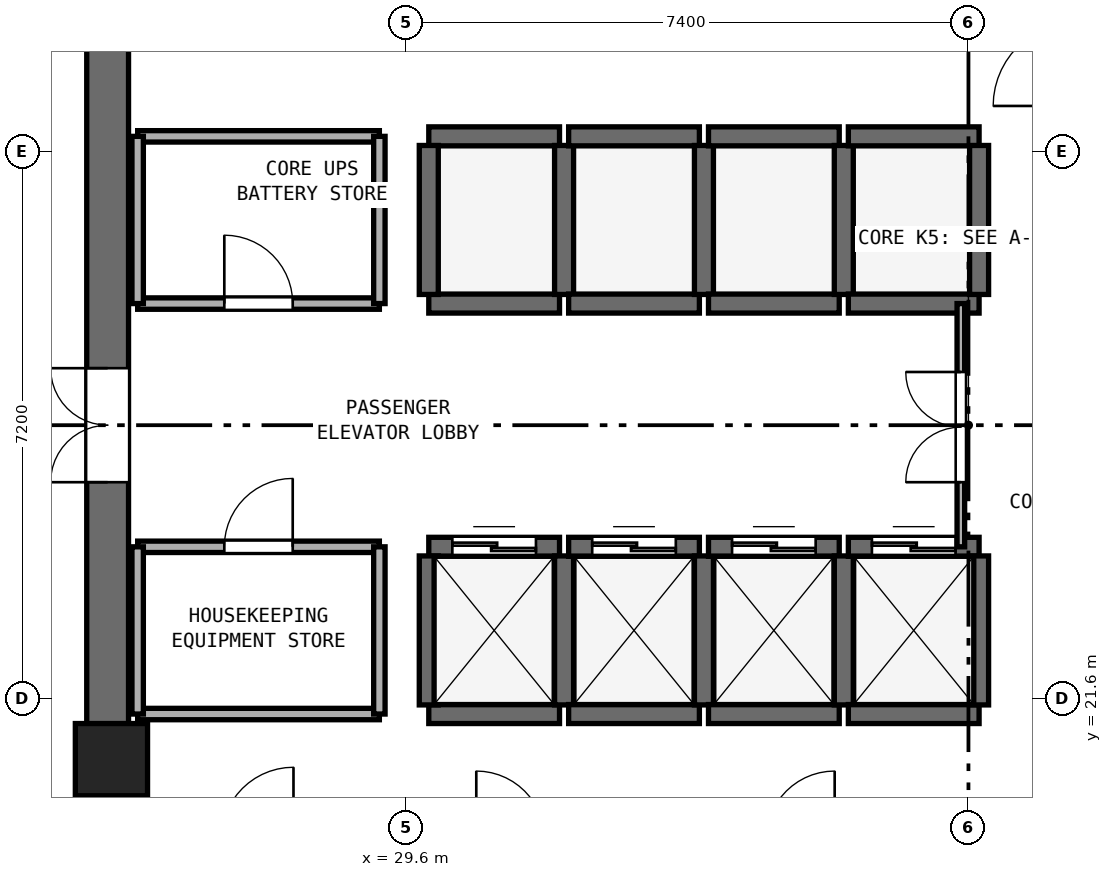
"""IFC4 building model, lengths in metres.
Left out: names, types, materials, properties, quantities, classifications, styles, units other than length and angle.
Written with IfcOpenShell. Run it as: python <this file> out.ifc"""

import sys

from ifc_helpers import new_model, si_unit, direction, frame, frame_2d, origin, origin_2d, place, context, subcontext, project, spatial, rectangle, extrude, element, fill, save


model = new_model("IFC4")
c1 = context("Model", 3, precision=1e-05, world=origin(), true_north=direction((0.0, 1.0)))
c2 = subcontext(c1, "Body", "Model", "MODEL_VIEW")
j1 = project(units=[si_unit("LENGTHUNIT", "METRE"), si_unit("PLANEANGLEUNIT", "RADIAN")], contexts=[c1])
p1 = place(None, origin())
s1 = spatial("IfcSite", under=j1, at=p1, CompositionType="ELEMENT")
p2 = place(p1, origin())
s2 = spatial("IfcBuilding", under=s1, at=p2, CompositionType="ELEMENT")
p3 = place(p2, frame((0.0, 0.0, 166.8)))
s3 = spatial("IfcBuildingStorey", under=s2, at=p3, CompositionType="ELEMENT", Elevation=166.8)
p4 = place(p3, frame((25.675, 17.55, 0.0), z_axis=(0.0, 0.0, 1.0), x_axis=(0.0, 1.0, 0.0)))
e1 = element("IfcWall", 1, at=p4, inside=s3, PredefinedType="SHEAR", context=c2, shape_type="SweptSolid", body=[
    extrude(rectangle(XDim=15.3, YDim=0.55, at=frame_2d((7.65, 0.0))), origin(), (0.0, 0.0, 1.0), 3.54),
])
p5 = place(p4, frame((6.9, 0.0, 0.0)))
e2 = element("IfcOpeningElement", 2, at=p5, cuts=e1, PredefinedType="OPENING", context=c2, shape_type="SweptSolid", body=[
    extrude(rectangle(XDim=1.5, YDim=2.15, at=frame_2d((0.75, 1.075))), frame((0.0, 0.285, 0.0), z_axis=(0.0, -1.0, 0.0), x_axis=(1.0, 0.0, 0.0)), (0.0, 0.0, 1.0), 0.57),
])
p6 = place(p3, frame((25.725, 20.8, 0.0), z_axis=(0.0, 0.0, 1.0), x_axis=(1.0, 0.0, 0.0)))
e3 = element("IfcColumn", 3, at=p6, inside=s3, PredefinedType="PILASTER", context=c2, shape_type="SweptSolid", body=[
    extrude(rectangle(XDim=0.95, YDim=0.95, at=origin_2d()), origin(), (0.0, 0.0, 1.0), 3.8),
])
p7 = place(p3, frame((29.9, 21.4, 0.0), z_axis=(0.0, 0.0, 1.0), x_axis=(1.0, 0.0, 0.0)))
e4 = element("IfcWall", 4, at=p7, inside=s3, PredefinedType="SHEAR", context=c2, shape_type="SweptSolid", body=[
    extrude(rectangle(XDim=1.72, YDim=0.25, at=frame_2d((0.86, 0.0))), origin(), (0.0, 0.0, 1.0), 3.54),
])
p8 = place(p3, frame((29.9, 23.6, 0.0), z_axis=(0.0, 0.0, 1.0), x_axis=(1.0, 0.0, 0.0)))
e5 = element("IfcWall", 5, at=p8, inside=s3, PredefinedType="SHEAR", context=c2, shape_type="SweptSolid", body=[
    extrude(rectangle(XDim=1.72, YDim=0.25, at=frame_2d((0.86, 0.0))), origin(), (0.0, 0.0, 1.0), 3.54),
])
p9 = place(p8, frame((0.31, 0.0, 0.0)))
e6 = element("IfcOpeningElement", 6, at=p9, cuts=e5, PredefinedType="OPENING", context=c2, shape_type="SweptSolid", body=[
    extrude(rectangle(XDim=1.1, YDim=2.15, at=frame_2d((0.55, 1.075))), frame((0.0, 0.135, 0.0), z_axis=(0.0, -1.0, 0.0), x_axis=(1.0, 0.0, 0.0)), (0.0, 0.0, 1.0), 0.27),
])
for number, where, z_axis, x_axis in (
    (7, (29.9, 21.52, 0.0), (0.0, 0.0, 1.0), (0.0, 1.0, 0.0)),
    (8, (31.68, 21.52, 0.0), (0.0, 0.0, 1.0), (0.0, 1.0, 0.0)),
):
    element("IfcWall", number, at=place(p3, frame(where, z_axis=z_axis, x_axis=x_axis)), inside=s3, PredefinedType="SHEAR", context=c2, shape_type="SweptSolid", body=[
        extrude(rectangle(XDim=1.96, YDim=0.25, at=frame_2d((0.98, 0.0))), origin(), (0.0, 0.0, 1.0), 3.54),
    ])
p10 = place(p3, frame((31.74, 21.4, 0.0), z_axis=(0.0, 0.0, 1.0), x_axis=(1.0, 0.0, 0.0)))
e9 = element("IfcWall", 9, at=p10, inside=s3, PredefinedType="SHEAR", context=c2, shape_type="SweptSolid", body=[
    extrude(rectangle(XDim=1.72, YDim=0.25, at=frame_2d((0.86, 0.0))), origin(), (0.0, 0.0, 1.0), 3.54),
])
p11 = place(p3, frame((31.74, 23.6, 0.0), z_axis=(0.0, 0.0, 1.0), x_axis=(1.0, 0.0, 0.0)))
e10 = element("IfcWall", 10, at=p11, inside=s3, PredefinedType="SHEAR", context=c2, shape_type="SweptSolid", body=[
    extrude(rectangle(XDim=1.72, YDim=0.25, at=frame_2d((0.86, 0.0))), origin(), (0.0, 0.0, 1.0), 3.54),
])
p12 = place(p11, frame((0.31, 0.0, 0.0)))
e11 = element("IfcOpeningElement", 11, at=p12, cuts=e10, PredefinedType="OPENING", context=c2, shape_type="SweptSolid", body=[
    extrude(rectangle(XDim=1.1, YDim=2.15, at=frame_2d((0.55, 1.075))), frame((0.0, 0.135, 0.0), z_axis=(0.0, -1.0, 0.0), x_axis=(1.0, 0.0, 0.0)), (0.0, 0.0, 1.0), 0.27),
])
p13 = place(p3, frame((33.52, 21.52, 0.0), z_axis=(0.0, 0.0, 1.0), x_axis=(0.0, 1.0, 0.0)))
e12 = element("IfcWall", 12, at=p13, inside=s3, PredefinedType="SHEAR", context=c2, shape_type="SweptSolid", body=[
    extrude(rectangle(XDim=1.96, YDim=0.25, at=frame_2d((0.98, 0.0))), origin(), (0.0, 0.0, 1.0), 3.54),
])
p14 = place(p3, frame((33.58, 21.4, 0.0), z_axis=(0.0, 0.0, 1.0), x_axis=(1.0, 0.0, 0.0)))
e13 = element("IfcWall", 13, at=p14, inside=s3, PredefinedType="SHEAR", context=c2, shape_type="SweptSolid", body=[
    extrude(rectangle(XDim=1.72, YDim=0.25, at=frame_2d((0.86, 0.0))), origin(), (0.0, 0.0, 1.0), 3.54),
])
p15 = place(p3, frame((33.58, 23.6, 0.0), z_axis=(0.0, 0.0, 1.0), x_axis=(1.0, 0.0, 0.0)))
e14 = element("IfcWall", 14, at=p15, inside=s3, PredefinedType="SHEAR", context=c2, shape_type="SweptSolid", body=[
    extrude(rectangle(XDim=1.72, YDim=0.25, at=frame_2d((0.86, 0.0))), origin(), (0.0, 0.0, 1.0), 3.54),
])
p16 = place(p15, frame((0.31, 0.0, 0.0)))
e15 = element("IfcOpeningElement", 15, at=p16, cuts=e14, PredefinedType="OPENING", context=c2, shape_type="SweptSolid", body=[
    extrude(rectangle(XDim=1.1, YDim=2.15, at=frame_2d((0.55, 1.075))), frame((0.0, 0.135, 0.0), z_axis=(0.0, -1.0, 0.0), x_axis=(1.0, 0.0, 0.0)), (0.0, 0.0, 1.0), 0.27),
])
p17 = place(p3, frame((35.36, 21.52, 0.0), z_axis=(0.0, 0.0, 1.0), x_axis=(0.0, 1.0, 0.0)))
e16 = element("IfcWall", 16, at=p17, inside=s3, PredefinedType="SHEAR", context=c2, shape_type="SweptSolid", body=[
    extrude(rectangle(XDim=1.96, YDim=0.25, at=frame_2d((0.98, 0.0))), origin(), (0.0, 0.0, 1.0), 3.54),
])
p18 = place(p3, frame((35.42, 21.4, 0.0), z_axis=(0.0, 0.0, 1.0), x_axis=(1.0, 0.0, 0.0)))
e17 = element("IfcWall", 17, at=p18, inside=s3, PredefinedType="SHEAR", context=c2, shape_type="SweptSolid", body=[
    extrude(rectangle(XDim=1.72, YDim=0.25, at=frame_2d((0.86, 0.0))), origin(), (0.0, 0.0, 1.0), 3.54),
])
p19 = place(p3, frame((35.42, 23.6, 0.0), z_axis=(0.0, 0.0, 1.0), x_axis=(1.0, 0.0, 0.0)))
e18 = element("IfcWall", 18, at=p19, inside=s3, PredefinedType="SHEAR", context=c2, shape_type="SweptSolid", body=[
    extrude(rectangle(XDim=1.72, YDim=0.25, at=frame_2d((0.86, 0.0))), origin(), (0.0, 0.0, 1.0), 3.54),
])
p20 = place(p19, frame((0.31, 0.0, 0.0)))
e19 = element("IfcOpeningElement", 19, at=p20, cuts=e18, PredefinedType="OPENING", context=c2, shape_type="SweptSolid", body=[
    extrude(rectangle(XDim=1.1, YDim=2.15, at=frame_2d((0.55, 1.075))), frame((0.0, 0.135, 0.0), z_axis=(0.0, -1.0, 0.0), x_axis=(1.0, 0.0, 0.0)), (0.0, 0.0, 1.0), 0.27),
])
p21 = place(p3, frame((37.14, 21.52, 0.0), z_axis=(0.0, 0.0, 1.0), x_axis=(0.0, 1.0, 0.0)))
e20 = element("IfcWall", 20, at=p21, inside=s3, PredefinedType="SHEAR", context=c2, shape_type="SweptSolid", body=[
    extrude(rectangle(XDim=1.96, YDim=0.25, at=frame_2d((0.98, 0.0))), origin(), (0.0, 0.0, 1.0), 3.54),
])
for number, where, z_axis, x_axis in (
    (21, (29.9, 26.8, 0.0), (0.0, 0.0, 1.0), (1.0, 0.0, 0.0)),
    (22, (29.9, 29.0, 0.0), (0.0, 0.0, 1.0), (1.0, 0.0, 0.0)),
):
    element("IfcWall", number, at=place(p3, frame(where, z_axis=z_axis, x_axis=x_axis)), inside=s3, PredefinedType="SHEAR", context=c2, shape_type="SweptSolid", body=[
        extrude(rectangle(XDim=1.72, YDim=0.25, at=frame_2d((0.86, 0.0))), origin(), (0.0, 0.0, 1.0), 3.54),
    ])
for number, where, z_axis, x_axis in (
    (23, (29.9, 26.92, 0.0), (0.0, 0.0, 1.0), (0.0, 1.0, 0.0)),
    (24, (31.68, 26.92, 0.0), (0.0, 0.0, 1.0), (0.0, 1.0, 0.0)),
):
    element("IfcWall", number, at=place(p3, frame(where, z_axis=z_axis, x_axis=x_axis)), inside=s3, PredefinedType="SHEAR", context=c2, shape_type="SweptSolid", body=[
        extrude(rectangle(XDim=1.96, YDim=0.25, at=frame_2d((0.98, 0.0))), origin(), (0.0, 0.0, 1.0), 3.54),
    ])
for number, where, z_axis, x_axis in (
    (25, (31.74, 26.8, 0.0), (0.0, 0.0, 1.0), (1.0, 0.0, 0.0)),
    (26, (31.74, 29.0, 0.0), (0.0, 0.0, 1.0), (1.0, 0.0, 0.0)),
):
    element("IfcWall", number, at=place(p3, frame(where, z_axis=z_axis, x_axis=x_axis)), inside=s3, PredefinedType="SHEAR", context=c2, shape_type="SweptSolid", body=[
        extrude(rectangle(XDim=1.72, YDim=0.25, at=frame_2d((0.86, 0.0))), origin(), (0.0, 0.0, 1.0), 3.54),
    ])
p22 = place(p3, frame((33.52, 26.92, 0.0), z_axis=(0.0, 0.0, 1.0), x_axis=(0.0, 1.0, 0.0)))
e27 = element("IfcWall", 27, at=p22, inside=s3, PredefinedType="SHEAR", context=c2, shape_type="SweptSolid", body=[
    extrude(rectangle(XDim=1.96, YDim=0.25, at=frame_2d((0.98, 0.0))), origin(), (0.0, 0.0, 1.0), 3.54),
])
for number, where, z_axis, x_axis in (
    (28, (33.58, 26.8, 0.0), (0.0, 0.0, 1.0), (1.0, 0.0, 0.0)),
    (29, (33.58, 29.0, 0.0), (0.0, 0.0, 1.0), (1.0, 0.0, 0.0)),
):
    element("IfcWall", number, at=place(p3, frame(where, z_axis=z_axis, x_axis=x_axis)), inside=s3, PredefinedType="SHEAR", context=c2, shape_type="SweptSolid", body=[
        extrude(rectangle(XDim=1.72, YDim=0.25, at=frame_2d((0.86, 0.0))), origin(), (0.0, 0.0, 1.0), 3.54),
    ])
p23 = place(p3, frame((35.36, 26.92, 0.0), z_axis=(0.0, 0.0, 1.0), x_axis=(0.0, 1.0, 0.0)))
e30 = element("IfcWall", 30, at=p23, inside=s3, PredefinedType="SHEAR", context=c2, shape_type="SweptSolid", body=[
    extrude(rectangle(XDim=1.96, YDim=0.25, at=frame_2d((0.98, 0.0))), origin(), (0.0, 0.0, 1.0), 3.54),
])
for number, where, z_axis, x_axis in (
    (31, (35.42, 26.8, 0.0), (0.0, 0.0, 1.0), (1.0, 0.0, 0.0)),
    (32, (35.42, 29.0, 0.0), (0.0, 0.0, 1.0), (1.0, 0.0, 0.0)),
):
    element("IfcWall", number, at=place(p3, frame(where, z_axis=z_axis, x_axis=x_axis)), inside=s3, PredefinedType="SHEAR", context=c2, shape_type="SweptSolid", body=[
        extrude(rectangle(XDim=1.72, YDim=0.25, at=frame_2d((0.86, 0.0))), origin(), (0.0, 0.0, 1.0), 3.54),
    ])
p24 = place(p3, frame((37.14, 26.92, 0.0), z_axis=(0.0, 0.0, 1.0), x_axis=(0.0, 1.0, 0.0)))
e33 = element("IfcWall", 33, at=p24, inside=s3, PredefinedType="SHEAR", context=c2, shape_type="SweptSolid", body=[
    extrude(rectangle(XDim=1.96, YDim=0.25, at=frame_2d((0.98, 0.0))), origin(), (0.0, 0.0, 1.0), 3.54),
])
p25 = place(p3, frame((26.07, 26.8, 0.0), z_axis=(0.0, 0.0, 1.0), x_axis=(1.0, 0.0, 0.0)))
e34 = element("IfcWall", 34, at=p25, inside=s3, PredefinedType="PARTITIONING", context=c2, shape_type="SweptSolid", body=[
    extrude(rectangle(XDim=3.18, YDim=0.15, at=frame_2d((1.59, 0.0))), origin(), (0.0, 0.0, 1.0), 3.54),
])
p26 = place(p25, frame((1.14, 0.0, 0.0)))
e35 = element("IfcOpeningElement", 35, at=p26, cuts=e34, PredefinedType="OPENING", context=c2, shape_type="SweptSolid", body=[
    extrude(rectangle(XDim=0.9, YDim=2.1, at=frame_2d((0.45, 1.05))), frame((0.0, 0.085, 0.0), z_axis=(0.0, -1.0, 0.0), x_axis=(1.0, 0.0, 0.0)), (0.0, 0.0, 1.0), 0.17),
])
p27 = place(p3, frame((26.07, 29.0, 0.0), z_axis=(0.0, 0.0, 1.0), x_axis=(1.0, 0.0, 0.0)))
e36 = element("IfcWall", 36, at=p27, inside=s3, PredefinedType="PARTITIONING", context=c2, shape_type="SweptSolid", body=[
    extrude(rectangle(XDim=3.18, YDim=0.15, at=frame_2d((1.59, 0.0))), origin(), (0.0, 0.0, 1.0), 3.54),
])
p28 = place(p3, frame((26.07, 26.8, 0.0), z_axis=(0.0, 0.0, 1.0), x_axis=(0.0, 1.0, 0.0)))
e37 = element("IfcWall", 37, at=p28, inside=s3, PredefinedType="PARTITIONING", context=c2, shape_type="SweptSolid", body=[
    extrude(rectangle(XDim=2.2, YDim=0.15, at=frame_2d((1.1, 0.0))), origin(), (0.0, 0.0, 1.0), 2.64),
])
p29 = place(p3, frame((29.25, 26.8, 0.0), z_axis=(0.0, 0.0, 1.0), x_axis=(0.0, 1.0, 0.0)))
e38 = element("IfcWall", 38, at=p29, inside=s3, PredefinedType="PARTITIONING", context=c2, shape_type="SweptSolid", body=[
    extrude(rectangle(XDim=2.2, YDim=0.15, at=frame_2d((1.1, 0.0))), origin(), (0.0, 0.0, 1.0), 3.54),
])
p30 = place(p3, frame((26.07, 21.4, 0.0), z_axis=(0.0, 0.0, 1.0), x_axis=(1.0, 0.0, 0.0)))
e39 = element("IfcWall", 39, at=p30, inside=s3, PredefinedType="PARTITIONING", context=c2, shape_type="SweptSolid", body=[
    extrude(rectangle(XDim=3.18, YDim=0.15, at=frame_2d((1.59, 0.0))), origin(), (0.0, 0.0, 1.0), 3.54),
])
p31 = place(p3, frame((26.07, 23.6, 0.0), z_axis=(0.0, 0.0, 1.0), x_axis=(1.0, 0.0, 0.0)))
e40 = element("IfcWall", 40, at=p31, inside=s3, PredefinedType="PARTITIONING", context=c2, shape_type="SweptSolid", body=[
    extrude(rectangle(XDim=3.18, YDim=0.15, at=frame_2d((1.59, 0.0))), origin(), (0.0, 0.0, 1.0), 3.54),
])
p32 = place(p31, frame((1.14, 0.0, 0.0)))
e41 = element("IfcOpeningElement", 41, at=p32, cuts=e40, PredefinedType="OPENING", context=c2, shape_type="SweptSolid", body=[
    extrude(rectangle(XDim=0.9, YDim=2.1, at=frame_2d((0.45, 1.05))), frame((0.0, 0.085, 0.0), z_axis=(0.0, -1.0, 0.0), x_axis=(1.0, 0.0, 0.0)), (0.0, 0.0, 1.0), 0.17),
])
p33 = place(p3, frame((26.07, 21.4, 0.0), z_axis=(0.0, 0.0, 1.0), x_axis=(0.0, 1.0, 0.0)))
e42 = element("IfcWall", 42, at=p33, inside=s3, PredefinedType="PARTITIONING", context=c2, shape_type="SweptSolid", body=[
    extrude(rectangle(XDim=2.2, YDim=0.15, at=frame_2d((1.1, 0.0))), origin(), (0.0, 0.0, 1.0), 2.64),
])
p34 = place(p3, frame((29.25, 21.4, 0.0), z_axis=(0.0, 0.0, 1.0), x_axis=(0.0, 1.0, 0.0)))
e43 = element("IfcWall", 43, at=p34, inside=s3, PredefinedType="PARTITIONING", context=c2, shape_type="SweptSolid", body=[
    extrude(rectangle(XDim=2.2, YDim=0.15, at=frame_2d((1.1, 0.0))), origin(), (0.0, 0.0, 1.0), 3.54),
])
p35 = place(p3, frame((36.9, 23.6, 0.0), z_axis=(0.0, 0.0, 1.0), x_axis=(0.0, 1.0, 0.0)))
e44 = element("IfcWall", 44, at=p35, inside=s3, PredefinedType="PARTITIONING", context=c2, shape_type="SweptSolid", body=[
    extrude(rectangle(XDim=3.2, YDim=0.1, at=frame_2d((1.6, 0.0))), origin(), (0.0, 0.0, 1.0), 3.54),
])
p36 = place(p35, frame((0.85, 0.0, 0.0)))
e45 = element("IfcOpeningElement", 45, at=p36, cuts=e44, PredefinedType="OPENING", context=c2, shape_type="SweptSolid", body=[
    extrude(rectangle(XDim=1.45, YDim=2.12, at=frame_2d((0.725, 1.06))), frame((0.0, 0.06, 0.0), z_axis=(0.0, -1.0, 0.0), x_axis=(1.0, 0.0, 0.0)), (0.0, 0.0, 1.0), 0.12),
])
p37 = place(p9, origin())
e46 = element("IfcDoor", 46, at=p37, inside=s3, OperationType="DOUBLE_DOOR_SLIDING", PredefinedType="DOOR", context=c2, shape_type="SweptSolid", body=[
    extrude(rectangle(XDim=1.1, YDim=2.15, at=frame_2d((0.55, 1.075))), frame((0.0, 0.025, 0.0), z_axis=(0.0, -1.0, 0.0), x_axis=(1.0, 0.0, 0.0)), (0.0, 0.0, 1.0), 0.05),
])
fill(e6, e46)
p38 = place(p12, origin())
e47 = element("IfcDoor", 47, at=p38, inside=s3, OperationType="DOUBLE_DOOR_SLIDING", PredefinedType="DOOR", context=c2, shape_type="SweptSolid", body=[
    extrude(rectangle(XDim=1.1, YDim=2.15, at=frame_2d((0.55, 1.075))), frame((0.0, 0.025, 0.0), z_axis=(0.0, -1.0, 0.0), x_axis=(1.0, 0.0, 0.0)), (0.0, 0.0, 1.0), 0.05),
])
fill(e11, e47)
p39 = place(p16, origin())
e48 = element("IfcDoor", 48, at=p39, inside=s3, OperationType="DOUBLE_DOOR_SLIDING", PredefinedType="DOOR", context=c2, shape_type="SweptSolid", body=[
    extrude(rectangle(XDim=1.1, YDim=2.15, at=frame_2d((0.55, 1.075))), frame((0.0, 0.025, 0.0), z_axis=(0.0, -1.0, 0.0), x_axis=(1.0, 0.0, 0.0)), (0.0, 0.0, 1.0), 0.05),
])
fill(e15, e48)
p40 = place(p20, origin())
e49 = element("IfcDoor", 49, at=p40, inside=s3, OperationType="DOUBLE_DOOR_SLIDING", PredefinedType="DOOR", context=c2, shape_type="SweptSolid", body=[
    extrude(rectangle(XDim=1.1, YDim=2.15, at=frame_2d((0.55, 1.075))), frame((0.0, 0.025, 0.0), z_axis=(0.0, -1.0, 0.0), x_axis=(1.0, 0.0, 0.0)), (0.0, 0.0, 1.0), 0.05),
])
fill(e19, e49)
p41 = place(p5, origin())
e50 = element("IfcDoor", 50, at=p41, inside=s3, OperationType="DOUBLE_DOOR_SINGLE_SWING", PredefinedType="DOOR", context=c2, shape_type="SweptSolid", body=[
    extrude(rectangle(XDim=1.5, YDim=2.15, at=frame_2d((0.75, 1.075))), frame((0.0, 0.025, 0.0), z_axis=(0.0, -1.0, 0.0), x_axis=(1.0, 0.0, 0.0)), (0.0, 0.0, 1.0), 0.05),
])
fill(e2, e50)
p42 = place(p26, origin())
e51 = element("IfcDoor", 51, at=p42, inside=s3, OperationType="SINGLE_SWING_LEFT", PredefinedType="DOOR", context=c2, shape_type="SweptSolid", body=[
    extrude(rectangle(XDim=0.9, YDim=2.1, at=frame_2d((0.45, 1.05))), frame((0.0, 0.025, 0.0), z_axis=(0.0, -1.0, 0.0), x_axis=(1.0, 0.0, 0.0)), (0.0, 0.0, 1.0), 0.05),
])
fill(e35, e51)
p43 = place(p32, origin())
e52 = element("IfcDoor", 52, at=p43, inside=s3, OperationType="SINGLE_SWING_RIGHT", PredefinedType="DOOR", context=c2, shape_type="SweptSolid", body=[
    extrude(rectangle(XDim=0.9, YDim=2.1, at=frame_2d((0.45, 1.05))), frame((0.0, 0.025, 0.0), z_axis=(0.0, -1.0, 0.0), x_axis=(1.0, 0.0, 0.0)), (0.0, 0.0, 1.0), 0.05),
])
fill(e41, e52)
p44 = place(p36, origin())
e53 = element("IfcDoor", 53, at=p44, inside=s3, OperationType="DOUBLE_DOOR_SINGLE_SWING", PredefinedType="DOOR", context=c2, shape_type="SweptSolid", body=[
    extrude(rectangle(XDim=1.45, YDim=2.12, at=frame_2d((0.725, 1.06))), frame((0.0, 0.025, 0.0), z_axis=(0.0, -1.0, 0.0), x_axis=(1.0, 0.0, 0.0)), (0.0, 0.0, 1.0), 0.05),
])
fill(e45, e53)
save(model, sys.argv[1])
